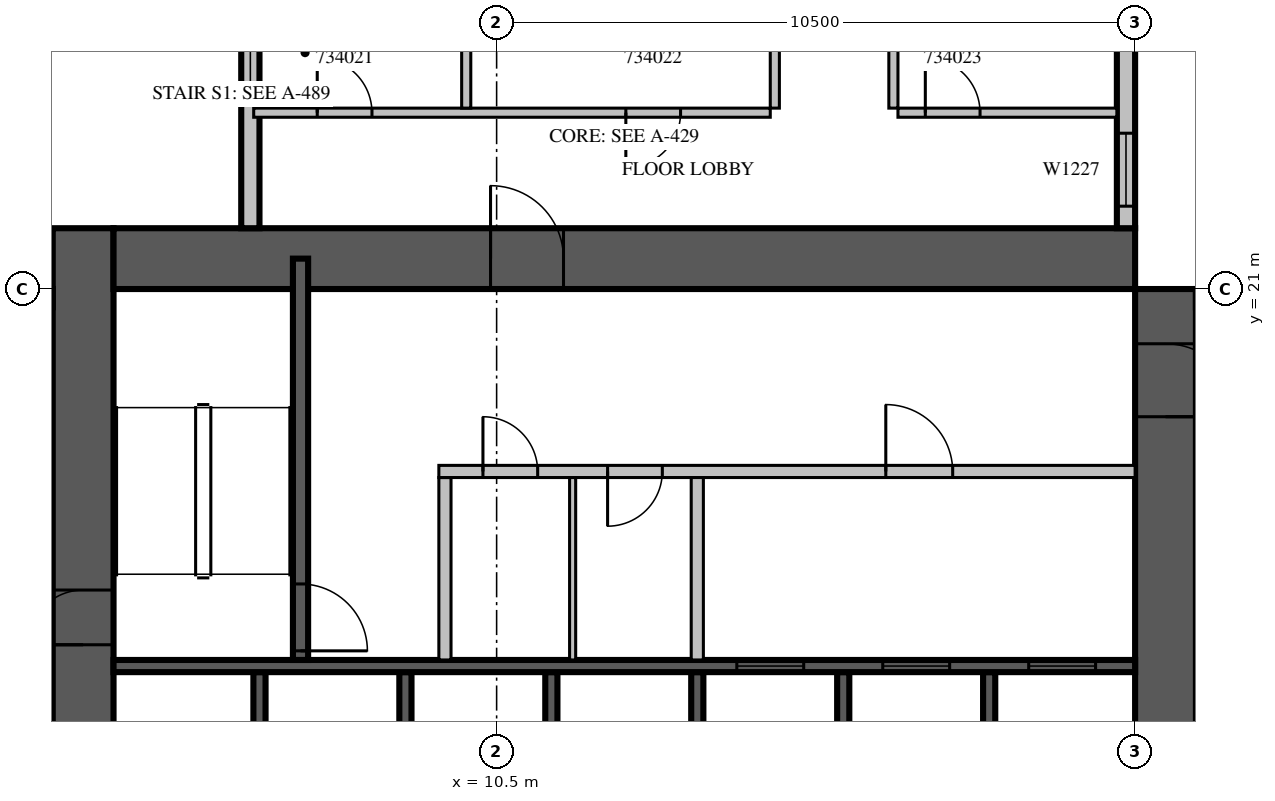
"""IFC4 building model, lengths in metres.
Left out: names, types, materials, properties, quantities, classifications, styles, units other than length and angle.
Written with IfcOpenShell. Run it as: python <this file> out.ifc"""

import sys

from ifc_helpers import new_model, si_unit, direction, frame, frame_2d, origin, place, context, subcontext, project, spatial, rectangle, extrude, source, transform, mapped, element, fill, save


model = new_model("IFC4")
c1 = context("Model", 3, precision=1e-05, world=origin(), true_north=direction((0.0, 1.0)))
c2 = subcontext(c1, "Body", "Model", "MODEL_VIEW")
j1 = project(units=[si_unit("LENGTHUNIT", "METRE"), si_unit("PLANEANGLEUNIT", "RADIAN")], contexts=[c1])
p1 = place(None, origin())
s1 = spatial("IfcSite", under=j1, at=p1, CompositionType="ELEMENT")
p2 = place(p1, origin())
s2 = spatial("IfcBuilding", under=s1, at=p2, CompositionType="ELEMENT")
p3 = place(p2, frame((0.0, 0.0, 153.9)))
s3 = spatial("IfcBuildingStorey", under=s2, at=p3, CompositionType="ELEMENT", Elevation=153.9)
m1 = source(origin(), c2, "Body", "SweptSolid", [
    extrude(rectangle(XDim=17.8, YDim=1.0, at=frame_2d((8.9, 0.0))), origin(), (0.0, 0.0, 1.0), 4.2),
])
p4 = place(p3, frame((3.7, 4.2, 0.0), z_axis=(0.0, 0.0, 1.0), x_axis=(0.0, 1.0, 0.0)))
e1 = element("IfcWall", 1, at=p4, inside=s3, PredefinedType="SHEAR", context=c2, shape_type="MappedRepresentation", body=[
    mapped(m1, transform((0.0, 0.0, 0.0), scale=1.0)),
])
m2 = source(origin(), c2, "Body", "SweptSolid", [
    extrude(rectangle(XDim=2.2, YDim=2.1, at=frame_2d((1.1, 1.05))), frame((0.0, 0.51, 0.0), z_axis=(0.0, -1.0, 0.0), x_axis=(1.0, 0.0, 0.0)), (0.0, 0.0, 1.0), 1.02),
])
p5 = place(p4, frame((4.2, 0.0, 0.0)))
e2 = element("IfcOpeningElement", 2, at=p5, cuts=e1, PredefinedType="OPENING", context=c2, shape_type="MappedRepresentation", body=[
    mapped(m2, transform((0.0, 0.0, 0.0), scale=1.0)),
])
m3 = source(origin(), c2, "Body", "SweptSolid", [
    extrude(rectangle(XDim=0.9, YDim=2.1, at=frame_2d((0.45, 1.05))), frame((0.0, 0.51, 0.0), z_axis=(0.0, -1.0, 0.0), x_axis=(1.0, 0.0, 0.0)), (0.0, 0.0, 1.0), 1.02),
])
p6 = place(p4, frame((10.95, 0.0, 0.0)))
e3 = element("IfcOpeningElement", 3, at=p6, cuts=e1, PredefinedType="OPENING", context=c2, shape_type="MappedRepresentation", body=[
    mapped(m3, transform((0.0, 0.0, 0.0), scale=1.0)),
])
m4 = source(origin(), c2, "Body", "SweptSolid", [
    extrude(rectangle(XDim=16.8, YDim=1.0, at=frame_2d((8.4, 0.0))), origin(), (0.0, 0.0, 1.0), 4.2),
])
p7 = place(p3, frame((21.5, 4.2, 0.0), z_axis=(0.0, 0.0, 1.0), x_axis=(0.0, 1.0, 0.0)))
e4 = element("IfcWall", 4, at=p7, inside=s3, PredefinedType="SHEAR", context=c2, shape_type="MappedRepresentation", body=[
    mapped(m4, transform((0.0, 0.0, 0.0), scale=1.0)),
])
m5 = source(origin(), c2, "Body", "SweptSolid", [
    extrude(rectangle(XDim=1.2, YDim=2.1, at=frame_2d((0.6, 1.05))), frame((0.0, 0.51, 0.0), z_axis=(0.0, -1.0, 0.0), x_axis=(1.0, 0.0, 0.0)), (0.0, 0.0, 1.0), 1.02),
])
p8 = place(p7, frame((14.7, 0.0, 0.0)))
e5 = element("IfcOpeningElement", 5, at=p8, cuts=e4, PredefinedType="OPENING", context=c2, shape_type="MappedRepresentation", body=[
    mapped(m5, transform((0.0, 0.0, 0.0), scale=1.0)),
])
p9 = place(p3, frame((4.2, 21.5, 0.0), z_axis=(0.0, 0.0, 1.0), x_axis=(1.0, 0.0, 0.0)))
e6 = element("IfcWall", 6, at=p9, inside=s3, PredefinedType="SHEAR", context=c2, shape_type="MappedRepresentation", body=[
    mapped(m4, transform((0.0, 0.0, 0.0), scale=1.0)),
])
p10 = place(p9, frame((6.2, 0.0, 0.0)))
e7 = element("IfcOpeningElement", 7, at=p10, cuts=e6, PredefinedType="OPENING", context=c2, shape_type="MappedRepresentation", body=[
    mapped(m5, transform((0.0, 0.0, 0.0), scale=1.0)),
])
m6 = source(origin(), c2, "Body", "SweptSolid", [
    extrude(rectangle(XDim=6.875, YDim=0.3, at=frame_2d((3.438, 0.0))), origin(), (0.0, 0.0, 1.0), 3.8),
])
p11 = place(p3, frame((20.85, 22.0, 0.0), z_axis=(0.0, 0.0, 1.0), x_axis=(0.0, 1.0, 0.0)))
e8 = element("IfcWall", 8, at=p11, inside=s3, PredefinedType="STANDARD", context=c2, shape_type="MappedRepresentation", body=[
    mapped(m6, transform((0.0, 0.0, 0.0), scale=1.0)),
])
m7 = source(origin(), c2, "Body", "SweptSolid", [
    extrude(rectangle(XDim=1.2, YDim=2.7, at=frame_2d((0.6, 1.35))), frame((0.0, 0.16, 0.0), z_axis=(0.0, -1.0, 0.0), x_axis=(1.0, 0.0, 0.0)), (0.0, 0.0, 1.0), 0.32),
])
p12 = place(p11, frame((0.362, 0.0, 0.6)))
e9 = element("IfcOpeningElement", 9, at=p12, cuts=e8, PredefinedType="OPENING", context=c2, shape_type="MappedRepresentation", body=[
    mapped(m7, transform((0.0, 0.0, 0.0), scale=1.0)),
])
m8 = source(origin(), c2, "Body", "SweptSolid", [
    extrude(rectangle(XDim=1.0, YDim=2.1, at=frame_2d((0.5, 1.05))), frame((0.0, 0.16, 0.0), z_axis=(0.0, -1.0, 0.0), x_axis=(1.0, 0.0, 0.0)), (0.0, 0.0, 1.0), 0.32),
])
p13 = place(p11, frame((4.8, 0.0, 0.0)))
e10 = element("IfcOpeningElement", 10, at=p13, cuts=e8, PredefinedType="OPENING", context=c2, shape_type="MappedRepresentation", body=[
    mapped(m8, transform((0.0, 0.0, 0.0), scale=1.0)),
])
m9 = source(origin(), c2, "Body", "SweptSolid", [
    extrude(rectangle(XDim=16.4, YDim=0.3, at=frame_2d((8.2, 0.0))), origin(), (0.0, 0.0, 1.0), 3.8),
])
p14 = place(p3, frame((6.45, 38.4, 0.0), z_axis=(0.0, 0.0, 1.0), x_axis=(0.0, -1.0, 0.0)))
e11 = element("IfcWall", 11, at=p14, inside=s3, PredefinedType="STANDARD", context=c2, shape_type="MappedRepresentation", body=[
    mapped(m9, transform((0.0, 0.0, 0.0), scale=1.0)),
])
m10 = source(origin(), c2, "Body", "SweptSolid", [
    extrude(rectangle(XDim=1.8, YDim=2.7, at=frame_2d((0.9, 1.35))), frame((0.0, 0.16, 0.0), z_axis=(0.0, -1.0, 0.0), x_axis=(1.0, 0.0, 0.0)), (0.0, 0.0, 1.0), 0.32),
])
p15 = place(p14, frame((1.15, 0.0, 0.6)))
e12 = element("IfcOpeningElement", 12, at=p15, cuts=e11, PredefinedType="OPENING", context=c2, shape_type="MappedRepresentation", body=[
    mapped(m10, transform((0.0, 0.0, 0.0), scale=1.0)),
])
m11 = source(origin(), c2, "Body", "SweptSolid", [
    extrude(rectangle(XDim=2.4, YDim=2.7, at=frame_2d((1.2, 1.35))), frame((0.0, 0.16, 0.0), z_axis=(0.0, -1.0, 0.0), x_axis=(1.0, 0.0, 0.0)), (0.0, 0.0, 1.0), 0.32),
])
p16 = place(p14, frame((4.75, 0.0, 0.6)))
e13 = element("IfcOpeningElement", 13, at=p16, cuts=e11, PredefinedType="OPENING", context=c2, shape_type="MappedRepresentation", body=[
    mapped(m11, transform((0.0, 0.0, 0.0), scale=1.0)),
])
p17 = place(p14, frame((12.912, 0.0, 0.6)))
e14 = element("IfcOpeningElement", 14, at=p17, cuts=e11, PredefinedType="OPENING", context=c2, shape_type="MappedRepresentation", body=[
    mapped(m7, transform((0.0, 0.0, 0.0), scale=1.0)),
])
p18 = place(p14, frame((10.142, 0.0, 0.0)))
e15 = element("IfcOpeningElement", 15, at=p18, cuts=e11, PredefinedType="OPENING", context=c2, shape_type="MappedRepresentation", body=[
    mapped(m8, transform((0.0, 0.0, 0.0), scale=1.0)),
])
m12 = source(origin(), c2, "Body", "SweptSolid", [
    extrude(rectangle(XDim=3.0, YDim=0.2, at=frame_2d((1.5, 0.0))), origin(), (0.0, 0.0, 1.0), 4.2),
])
for number, where, z_axis, x_axis in (
    (16, (6.6, 11.7, 0.0), (0.0, 0.0, 1.0), (0.0, 1.0, 0.0)),
    (17, (9.0, 11.7, 0.0), (0.0, 0.0, 1.0), (0.0, 1.0, 0.0)),
    (18, (11.4, 11.7, 0.0), (0.0, 0.0, 1.0), (0.0, 1.0, 0.0)),
    (19, (13.8, 11.7, 0.0), (0.0, 0.0, 1.0), (0.0, 1.0, 0.0)),
    (20, (16.2, 11.7, 0.0), (0.0, 0.0, 1.0), (0.0, 1.0, 0.0)),
    (21, (18.6, 11.7, 0.0), (0.0, 0.0, 1.0), (0.0, 1.0, 0.0)),
):
    element("IfcWall", number, at=place(p3, frame(where, z_axis=z_axis, x_axis=x_axis)), inside=s3, PredefinedType="SOLIDWALL", context=c2, shape_type="MappedRepresentation", body=[
        mapped(m12, transform((0.0, 0.0, 0.0), scale=1.0)),
    ])
m13 = source(origin(), c2, "Body", "SweptSolid", [
    extrude(rectangle(XDim=16.8, YDim=0.2, at=frame_2d((8.4, 0.0))), origin(), (0.0, 0.0, 1.0), 4.2),
])
p19 = place(p3, frame((4.2, 14.8, 0.0), z_axis=(0.0, 0.0, 1.0), x_axis=(1.0, 0.0, 0.0)))
e22 = element("IfcWall", 22, at=p19, inside=s3, PredefinedType="SOLIDWALL", context=c2, shape_type="MappedRepresentation", body=[
    mapped(m13, transform((0.0, 0.0, 0.0), scale=1.0)),
])
m14 = source(origin(), c2, "Body", "SweptSolid", [
    extrude(rectangle(XDim=1.1, YDim=2.1, at=frame_2d((0.55, 1.05))), frame((0.0, 0.11, 0.0), z_axis=(0.0, -1.0, 0.0), x_axis=(1.0, 0.0, 0.0)), (0.0, 0.0, 1.0), 0.22),
])
p20 = place(p19, frame((10.25, 0.0, 0.0)))
e23 = element("IfcOpeningElement", 23, at=p20, cuts=e22, PredefinedType="OPENING", context=c2, shape_type="MappedRepresentation", body=[
    mapped(m14, transform((0.0, 0.0, 0.0), scale=1.0)),
])
p21 = place(p19, frame((12.65, 0.0, 0.0)))
e24 = element("IfcOpeningElement", 24, at=p21, cuts=e22, PredefinedType="OPENING", context=c2, shape_type="MappedRepresentation", body=[
    mapped(m14, transform((0.0, 0.0, 0.0), scale=1.0)),
])
p22 = place(p19, frame((15.05, 0.0, 0.0)))
e25 = element("IfcOpeningElement", 25, at=p22, cuts=e22, PredefinedType="OPENING", context=c2, shape_type="MappedRepresentation", body=[
    mapped(m14, transform((0.0, 0.0, 0.0), scale=1.0)),
])
m15 = source(origin(), c2, "Body", "SweptSolid", [
    extrude(rectangle(XDim=6.6, YDim=0.25, at=frame_2d((3.3, 0.0))), origin(), (0.0, 0.0, 1.0), 3.8),
])
p23 = place(p3, frame((7.275, 14.9, 0.0), z_axis=(0.0, 0.0, 1.0), x_axis=(0.0, 1.0, 0.0)))
e26 = element("IfcWall", 26, at=p23, inside=s3, PredefinedType="SOLIDWALL", context=c2, shape_type="MappedRepresentation", body=[
    mapped(m15, transform((0.0, 0.0, 0.0), scale=1.0)),
])
m16 = source(origin(), c2, "Body", "SweptSolid", [
    extrude(rectangle(XDim=1.1, YDim=2.1, at=frame_2d((0.55, 1.05))), frame((0.0, 0.135, 0.0), z_axis=(0.0, -1.0, 0.0), x_axis=(1.0, 0.0, 0.0)), (0.0, 0.0, 1.0), 0.27),
])
p24 = place(p23, frame((0.15, 0.0, 0.0)))
e27 = element("IfcOpeningElement", 27, at=p24, cuts=e26, PredefinedType="OPENING", context=c2, shape_type="MappedRepresentation", body=[
    mapped(m16, transform((0.0, 0.0, 0.0), scale=1.0)),
])
m17 = source(origin(), c2, "Body", "SweptSolid", [
    extrude(rectangle(XDim=3.0, YDim=0.2, at=frame_2d((1.5, 0.0))), origin(), (0.0, 0.0, 1.0), 3.8),
])
p25 = place(p3, frame((9.65, 14.9, 0.0), z_axis=(0.0, 0.0, 1.0), x_axis=(0.0, 1.0, 0.0)))
e28 = element("IfcWall", 28, at=p25, inside=s3, PredefinedType="PARTITIONING", context=c2, shape_type="MappedRepresentation", body=[
    mapped(m17, transform((0.0, 0.0, 0.0), scale=1.0)),
])
m18 = source(origin(), c2, "Body", "SweptSolid", [
    extrude(rectangle(XDim=11.45, YDim=0.2, at=frame_2d((5.725, 0.0))), origin(), (0.0, 0.0, 1.0), 3.8),
])
p26 = place(p3, frame((9.55, 18.0, 0.0), z_axis=(0.0, 0.0, 1.0), x_axis=(1.0, 0.0, 0.0)))
e29 = element("IfcWall", 29, at=p26, inside=s3, PredefinedType="PARTITIONING", context=c2, shape_type="MappedRepresentation", body=[
    mapped(m18, transform((0.0, 0.0, 0.0), scale=1.0)),
])
m19 = source(origin(), c2, "Body", "SweptSolid", [
    extrude(rectangle(XDim=0.9, YDim=2.1, at=frame_2d((0.45, 1.05))), frame((0.0, 0.11, 0.0), z_axis=(0.0, -1.0, 0.0), x_axis=(1.0, 0.0, 0.0)), (0.0, 0.0, 1.0), 0.22),
])
p27 = place(p26, frame((0.725, 0.0, 0.0)))
e30 = element("IfcOpeningElement", 30, at=p27, cuts=e29, PredefinedType="OPENING", context=c2, shape_type="MappedRepresentation", body=[
    mapped(m19, transform((0.0, 0.0, 0.0), scale=1.0)),
])
p28 = place(p26, frame((2.775, 0.0, 0.0)))
e31 = element("IfcOpeningElement", 31, at=p28, cuts=e29, PredefinedType="OPENING", context=c2, shape_type="MappedRepresentation", body=[
    mapped(m19, transform((0.0, 0.0, 0.0), scale=1.0)),
])
p29 = place(p26, frame((7.35, 0.0, 0.0)))
e32 = element("IfcOpeningElement", 32, at=p29, cuts=e29, PredefinedType="OPENING", context=c2, shape_type="MappedRepresentation", body=[
    mapped(m14, transform((0.0, 0.0, 0.0), scale=1.0)),
])
p30 = place(p3, frame((13.8, 14.9, 0.0), z_axis=(0.0, 0.0, 1.0), x_axis=(0.0, 1.0, 0.0)))
e33 = element("IfcWall", 33, at=p30, inside=s3, PredefinedType="PARTITIONING", context=c2, shape_type="MappedRepresentation", body=[
    mapped(m17, transform((0.0, 0.0, 0.0), scale=1.0)),
])
m20 = source(origin(), c2, "Body", "SweptSolid", [
    extrude(rectangle(XDim=3.0, YDim=0.1, at=frame_2d((1.5, 0.0))), origin(), (0.0, 0.0, 1.0), 3.8),
])
p31 = place(p3, frame((11.75, 14.9, 0.0), z_axis=(0.0, 0.0, 1.0), x_axis=(0.0, 1.0, 0.0)))
e34 = element("IfcWall", 34, at=p31, inside=s3, PredefinedType="PARTITIONING", context=c2, shape_type="MappedRepresentation", body=[
    mapped(m20, transform((0.0, 0.0, 0.0), scale=1.0)),
])
m21 = source(origin(), c2, "Body", "SweptSolid", [
    extrude(rectangle(XDim=8.495, YDim=0.15, at=frame_2d((4.247, 0.0))), origin(), (0.0, 0.0, 1.0), 3.8),
])
p32 = place(p3, frame((6.505, 23.9, 0.0), z_axis=(0.0, 0.0, 1.0), x_axis=(1.0, 0.0, 0.0)))
e35 = element("IfcWall", 35, at=p32, inside=s3, PredefinedType="PARTITIONING", context=c2, shape_type="MappedRepresentation", body=[
    mapped(m21, transform((0.0, 0.0, 0.0), scale=1.0)),
])
m22 = source(origin(), c2, "Body", "SweptSolid", [
    extrude(rectangle(XDim=0.9, YDim=2.1, at=frame_2d((0.45, 1.05))), frame((0.0, 0.085, 0.0), z_axis=(0.0, -1.0, 0.0), x_axis=(1.0, 0.0, 0.0)), (0.0, 0.0, 1.0), 0.17),
])
p33 = place(p32, frame((1.045, 0.0, 0.0)))
e36 = element("IfcOpeningElement", 36, at=p33, cuts=e35, PredefinedType="OPENING", context=c2, shape_type="MappedRepresentation", body=[
    mapped(m22, transform((0.0, 0.0, 0.0), scale=1.0)),
])
p34 = place(p32, frame((6.12, 0.0, 0.0)))
e37 = element("IfcOpeningElement", 37, at=p34, cuts=e35, PredefinedType="OPENING", context=c2, shape_type="MappedRepresentation", body=[
    mapped(m22, transform((0.0, 0.0, 0.0), scale=1.0)),
])
m23 = source(origin(), c2, "Body", "SweptSolid", [
    extrude(rectangle(XDim=3.6, YDim=0.15, at=frame_2d((1.8, 0.0))), origin(), (0.0, 0.0, 1.0), 3.8),
])
p35 = place(p3, frame((17.1, 23.9, 0.0), z_axis=(0.0, 0.0, 1.0), x_axis=(1.0, 0.0, 0.0)))
e38 = element("IfcWall", 38, at=p35, inside=s3, PredefinedType="PARTITIONING", context=c2, shape_type="MappedRepresentation", body=[
    mapped(m23, transform((0.0, 0.0, 0.0), scale=1.0)),
])
p36 = place(p35, frame((0.45, 0.0, 0.0)))
e39 = element("IfcOpeningElement", 39, at=p36, cuts=e38, PredefinedType="OPENING", context=c2, shape_type="MappedRepresentation", body=[
    mapped(m22, transform((0.0, 0.0, 0.0), scale=1.0)),
])
m24 = source(origin(), c2, "Body", "SweptSolid", [
    extrude(rectangle(XDim=4.901, YDim=0.15, at=frame_2d((2.45, 0.0))), origin(), (0.0, 0.0, 1.0), 3.8),
])
p37 = place(p3, frame((10.0, 23.975, 0.0), z_axis=(0.0, 0.0, 1.0), x_axis=(0.0, 1.0, 0.0)))
e40 = element("IfcWall", 40, at=p37, inside=s3, PredefinedType="PARTITIONING", context=c2, shape_type="MappedRepresentation", body=[
    mapped(m24, transform((0.0, 0.0, 0.0), scale=1.0)),
])
m25 = source(origin(), c2, "Body", "SweptSolid", [
    extrude(rectangle(XDim=5.35, YDim=0.15, at=frame_2d((2.675, 0.0))), origin(), (0.0, 0.0, 1.0), 3.8),
])
for number, where, z_axis, x_axis in (
    (41, (15.075, 23.975, 0.0), (0.0, 0.0, 1.0), (0.0, 1.0, 0.0)),
    (42, (17.025, 29.325, 0.0), (0.0, 0.0, 1.0), (0.0, -1.0, 0.0)),
):
    element("IfcWall", number, at=place(p3, frame(where, z_axis=z_axis, x_axis=x_axis)), inside=s3, PredefinedType="PARTITIONING", context=c2, shape_type="MappedRepresentation", body=[
        mapped(m25, transform((0.0, 0.0, 0.0), scale=1.0)),
    ])
m26 = source(origin(), c2, "Body", "SweptSolid", [
    extrude(rectangle(XDim=1.2, YDim=2.7, at=frame_2d((0.6, 1.35))), frame((0.0, 0.03, 0.0), z_axis=(0.0, -1.0, 0.0), x_axis=(1.0, 0.0, 0.0)), (0.0, 0.0, 1.0), 0.06),
])
p38 = place(p12, origin())
e43 = element("IfcWindow", 43, at=p38, inside=s3, PartitioningType="SINGLE_PANEL", PredefinedType="WINDOW", context=c2, shape_type="MappedRepresentation", body=[
    mapped(m26, transform((0.0, 0.0, 0.0), scale=1.0)),
])
fill(e9, e43)
p39 = place(p17, origin())
e44 = element("IfcWindow", 44, at=p39, inside=s3, PartitioningType="SINGLE_PANEL", PredefinedType="WINDOW", context=c2, shape_type="MappedRepresentation", body=[
    mapped(m26, transform((0.0, 0.0, 0.0), scale=1.0)),
])
fill(e14, e44)
m27 = source(origin(), c2, "Body", "SweptSolid", [
    extrude(rectangle(XDim=1.1, YDim=2.1, at=frame_2d((0.55, 1.05))), frame((0.0, 0.025, 0.0), z_axis=(0.0, -1.0, 0.0), x_axis=(1.0, 0.0, 0.0)), (0.0, 0.0, 1.0), 0.05),
])
p40 = place(p20, origin())
e45 = element("IfcDoor", 45, at=p40, inside=s3, OperationType="SLIDING_TO_LEFT", PredefinedType="DOOR", context=c2, shape_type="MappedRepresentation", body=[
    mapped(m27, transform((0.0, 0.0, 0.0), scale=1.0)),
])
fill(e23, e45)
p41 = place(p21, origin())
e46 = element("IfcDoor", 46, at=p41, inside=s3, OperationType="SLIDING_TO_LEFT", PredefinedType="DOOR", context=c2, shape_type="MappedRepresentation", body=[
    mapped(m27, transform((0.0, 0.0, 0.0), scale=1.0)),
])
fill(e24, e46)
p42 = place(p22, origin())
e47 = element("IfcDoor", 47, at=p42, inside=s3, OperationType="SLIDING_TO_LEFT", PredefinedType="DOOR", context=c2, shape_type="MappedRepresentation", body=[
    mapped(m27, transform((0.0, 0.0, 0.0), scale=1.0)),
])
fill(e25, e47)
p43 = place(p24, origin())
e48 = element("IfcDoor", 48, at=p43, inside=s3, OperationType="SINGLE_SWING_RIGHT", PredefinedType="DOOR", context=c2, shape_type="MappedRepresentation", body=[
    mapped(m27, transform((0.0, 0.0, 0.0), scale=1.0)),
])
fill(e27, e48)
m28 = source(origin(), c2, "Body", "SweptSolid", [
    extrude(rectangle(XDim=0.9, YDim=2.1, at=frame_2d((0.45, 1.05))), frame((0.0, 0.025, 0.0), z_axis=(0.0, -1.0, 0.0), x_axis=(1.0, 0.0, 0.0)), (0.0, 0.0, 1.0), 0.05),
])
p44 = place(p27, origin())
e49 = element("IfcDoor", 49, at=p44, inside=s3, OperationType="SINGLE_SWING_LEFT", PredefinedType="DOOR", context=c2, shape_type="MappedRepresentation", body=[
    mapped(m28, transform((0.0, 0.0, 0.0), scale=1.0)),
])
fill(e30, e49)
p45 = place(p28, origin())
e50 = element("IfcDoor", 50, at=p45, inside=s3, OperationType="SINGLE_SWING_RIGHT", PredefinedType="DOOR", context=c2, shape_type="MappedRepresentation", body=[
    mapped(m28, transform((0.0, 0.0, 0.0), scale=1.0)),
])
fill(e31, e50)
p46 = place(p29, origin())
e51 = element("IfcDoor", 51, at=p46, inside=s3, OperationType="SINGLE_SWING_LEFT", PredefinedType="DOOR", context=c2, shape_type="MappedRepresentation", body=[
    mapped(m27, transform((0.0, 0.0, 0.0), scale=1.0)),
])
fill(e32, e51)
m29 = source(origin(), c2, "Body", "SweptSolid", [
    extrude(rectangle(XDim=1.2, YDim=2.1, at=frame_2d((0.6, 1.05))), frame((0.0, 0.025, 0.0), z_axis=(0.0, -1.0, 0.0), x_axis=(1.0, 0.0, 0.0)), (0.0, 0.0, 1.0), 0.05),
])
p47 = place(p10, origin())
e52 = element("IfcDoor", 52, at=p47, inside=s3, OperationType="SINGLE_SWING_LEFT", PredefinedType="DOOR", context=c2, shape_type="MappedRepresentation", body=[
    mapped(m29, transform((0.0, 0.0, 0.0), scale=1.0)),
])
fill(e7, e52)
p48 = place(p8, origin())
e53 = element("IfcDoor", 53, at=p48, inside=s3, OperationType="SINGLE_SWING_RIGHT", PredefinedType="DOOR", context=c2, shape_type="MappedRepresentation", body=[
    mapped(m29, transform((0.0, 0.0, 0.0), scale=1.0)),
])
fill(e5, e53)
p49 = place(p6, origin())
e54 = element("IfcDoor", 54, at=p49, inside=s3, OperationType="SINGLE_SWING_LEFT", PredefinedType="DOOR", context=c2, shape_type="MappedRepresentation", body=[
    mapped(m28, transform((0.0, 0.0, 0.0), scale=1.0)),
])
fill(e3, e54)
p50 = place(p33, origin())
e55 = element("IfcDoor", 55, at=p50, inside=s3, OperationType="SINGLE_SWING_LEFT", PredefinedType="DOOR", context=c2, shape_type="MappedRepresentation", body=[
    mapped(m28, transform((0.0, 0.0, 0.0), scale=1.0)),
])
fill(e36, e55)
p51 = place(p34, origin())
e56 = element("IfcDoor", 56, at=p51, inside=s3, OperationType="SINGLE_SWING_RIGHT", PredefinedType="DOOR", context=c2, shape_type="MappedRepresentation", body=[
    mapped(m28, transform((0.0, 0.0, 0.0), scale=1.0)),
])
fill(e37, e56)
p52 = place(p36, origin())
e57 = element("IfcDoor", 57, at=p52, inside=s3, OperationType="SINGLE_SWING_LEFT", PredefinedType="DOOR", context=c2, shape_type="MappedRepresentation", body=[
    mapped(m28, transform((0.0, 0.0, 0.0), scale=1.0)),
])
fill(e39, e57)
save(model, sys.argv[1])
